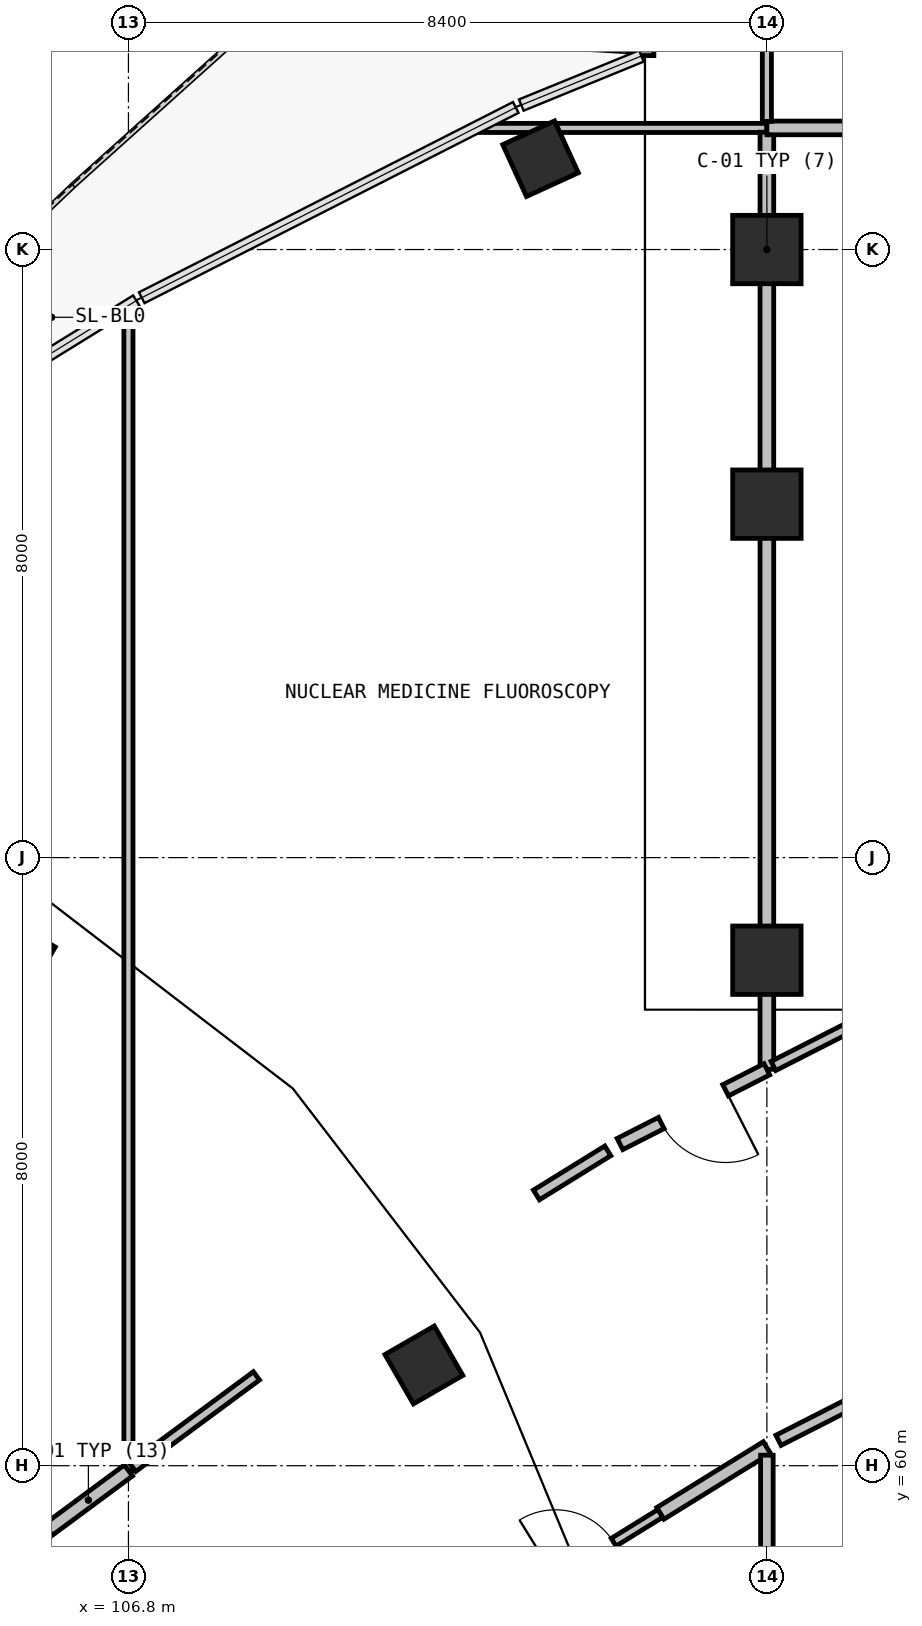
"""IFC4 building model, lengths in metres.
Left out: names, types, materials, properties, quantities, classifications, styles, units other than length and angle.
Written with IfcOpenShell. Run it as: python <this file> out.ifc"""

import sys

from ifc_helpers import new_model, si_unit, direction, frame, frame_2d, origin, origin_2d, place, context, subcontext, project, spatial, rectangle, circle, extrude, element, fill, save


model = new_model("IFC4")
c1 = context("Model", 3, precision=1e-05, world=origin(), true_north=direction((0.0, 1.0)))
c2 = subcontext(c1, "Body", "Model", "MODEL_VIEW")
j1 = project(units=[si_unit("LENGTHUNIT", "METRE"), si_unit("PLANEANGLEUNIT", "RADIAN")], contexts=[c1])
p1 = place(None, origin())
s1 = spatial("IfcSite", under=j1, at=p1, CompositionType="ELEMENT")
p2 = place(p1, origin())
s2 = spatial("IfcBuilding", under=s1, at=p2, CompositionType="ELEMENT")
p3 = place(p2, origin())
s3 = spatial("IfcBuildingStorey", under=s2, at=p3, CompositionType="ELEMENT", Elevation=0.0)
p4 = place(p3, frame((110.687, 61.325, 0.0), z_axis=(0.0, 0.0, 1.0), x_axis=(0.866025403784, 0.5, 0.0)))
e1 = element("IfcColumn", 1, at=p4, inside=s3, PredefinedType="COLUMN", context=c2, shape_type="SweptSolid", body=[
    extrude(circle(Radius=0.375, at=origin_2d()), origin(), (0.0, 0.0, 1.0), 5.4),
])
for number, where, z_axis, x_axis in (
    (2, (115.2, 66.65, 0.0), (0.0, 0.0, 1.0), (1.0, 0.0, 0.0)),
    (3, (115.2, 72.65, 0.0), (0.0, 0.0, 1.0), (1.0, 0.0, 0.0)),
    (4, (115.2, 76.0, 0.0), (0.0, 0.0, 1.0), (1.0, 0.0, 0.0)),
):
    element("IfcColumn", number, at=place(p3, frame(where, z_axis=z_axis, x_axis=x_axis)), inside=s3, PredefinedType="COLUMN", context=c2, shape_type="SweptSolid", body=[
        extrude(rectangle(XDim=0.9, YDim=0.9, at=origin_2d()), origin(), (0.0, 0.0, 1.0), 5.4),
    ])
p5 = place(p3, frame((112.222, 77.195, 0.0), z_axis=(0.0, 0.0, 1.0), x_axis=(-0.416201444857, 0.909272432937, 0.0)))
e5 = element("IfcColumn", 5, at=p5, inside=s3, PredefinedType="COLUMN", context=c2, shape_type="SweptSolid", body=[
    extrude(rectangle(XDim=0.75, YDim=0.75, at=origin_2d()), origin(), (0.0, 0.0, 1.0), 5.4),
])
p6 = place(p3, frame((113.563, 78.552, 0.0), z_axis=(0.0, 0.0, 1.0), x_axis=(0.006887325881, 0.99997628209, 0.0)))
e6 = element("IfcWall", 6, at=p6, inside=s3, PredefinedType="SOLIDWALL", context=c2, shape_type="SweptSolid", body=[
    extrude(rectangle(XDim=5.388, YDim=0.3, at=frame_2d((2.694, 0.0))), origin(), (0.0, 0.0, 1.0), 5.08),
])
p7 = place(p6, frame((1.344, 0.0, 0.96)))
e7 = element("IfcOpeningElement", 7, at=p7, cuts=e6, PredefinedType="OPENING", context=c2, shape_type="SweptSolid", body=[
    extrude(rectangle(XDim=2.7, YDim=1.5, at=frame_2d((1.35, 0.75))), frame((0.0, 0.16, 0.0), z_axis=(0.0, -1.0, 0.0), x_axis=(1.0, 0.0, 0.0)), (0.0, 0.0, 1.0), 0.32),
])
p8 = place(p3, frame((106.8, 75.251, 0.0), z_axis=(0.0, 0.0, 1.0), x_axis=(0.0, -1.0, 0.0)))
e8 = element("IfcWall", 8, at=p8, inside=s3, PredefinedType="PARTITIONING", context=c2, shape_type="SweptSolid", body=[
    extrude(rectangle(XDim=15.314, YDim=0.12, at=frame_2d((7.657, 0.0))), origin(), (0.0, 0.0, 1.0), 5.08),
])
p9 = place(p3, frame((106.8, 59.937, 0.0), z_axis=(0.0, 0.0, 1.0), x_axis=(-0.803804504583, -0.594893535359, 0.0)))
e9 = element("IfcWall", 9, at=p9, inside=s3, PredefinedType="PARTITIONING", context=c2, shape_type="SweptSolid", body=[
    extrude(rectangle(XDim=1.311, YDim=0.18, at=frame_2d((0.656, 0.0))), origin(), (0.0, 0.0, 1.0), 5.08),
])
p10 = place(p3, frame((111.803, 58.14, 0.0), z_axis=(0.0, 0.0, 1.0), x_axis=(0.850745998742, 0.525577059644, 0.0)))
e10 = element("IfcWall", 10, at=p10, inside=s3, PredefinedType="PARTITIONING", context=c2, shape_type="SweptSolid", body=[
    extrude(rectangle(XDim=2.346, YDim=0.12, at=frame_2d((1.173, 0.0))), origin(), (0.0, 0.0, 1.0), 5.08),
])
p11 = place(p10, frame((0.723, 0.0, 0.0)))
e11 = element("IfcOpeningElement", 11, at=p11, cuts=e10, PredefinedType="OPENING", context=c2, shape_type="SweptSolid", body=[
    extrude(rectangle(XDim=0.9, YDim=2.1, at=frame_2d((0.45, 1.05))), frame((0.0, 0.07, 0.0), z_axis=(0.0, -1.0, 0.0), x_axis=(1.0, 0.0, 0.0)), (0.0, 0.0, 1.0), 0.14),
])
p12 = place(p3, frame((113.799, 59.373, 0.0), z_axis=(0.0, 0.0, 1.0), x_axis=(0.850603007896, 0.525808447021, 0.0)))
e12 = element("IfcWall", 12, at=p12, inside=s3, PredefinedType="PARTITIONING", context=c2, shape_type="SweptSolid", body=[
    extrude(rectangle(XDim=1.647, YDim=0.18, at=frame_2d((0.823, 0.0))), origin(), (0.0, 0.0, 1.0), 5.08),
])
p13 = place(p3, frame((115.2, 60.138, 0.0), z_axis=(0.0, 0.0, 1.0), x_axis=(0.0, -1.0, 0.0)))
e13 = element("IfcWall", 13, at=p13, inside=s3, PredefinedType="PARTITIONING", context=c2, shape_type="SweptSolid", body=[
    extrude(rectangle(XDim=15.538, YDim=0.165, at=frame_2d((7.769, 0.0))), origin(), (0.0, 0.0, 1.0), 5.08),
])
p14 = place(p3, frame((113.107, 64.142, 0.0), z_axis=(0.0, 0.0, 1.0), x_axis=(-0.850745635825, -0.525577647093, 0.0)))
e14 = element("IfcWall", 14, at=p14, inside=s3, PredefinedType="PARTITIONING", context=c2, shape_type="SweptSolid", body=[
    extrude(rectangle(XDim=1.104, YDim=0.15, at=frame_2d((0.552, 0.0))), origin(), (0.0, 0.0, 1.0), 5.08),
])
p15 = place(p3, frame((108.484, 61.182, 0.0), z_axis=(0.0, 0.0, 1.0), x_axis=(-0.804033278553, -0.594584297622, 0.0)))
e15 = element("IfcWall", 15, at=p15, inside=s3, PredefinedType="PARTITIONING", context=c2, shape_type="SweptSolid", body=[
    extrude(rectangle(XDim=2.025, YDim=0.135, at=frame_2d((1.012, 0.0))), origin(), (0.0, 0.0, 1.0), 5.08),
])
p16 = place(p3, frame((111.391, 77.6, 0.0), z_axis=(0.0, 0.0, 1.0), x_axis=(1.0, 0.0, 0.0)))
e16 = element("IfcWall", 16, at=p16, inside=s3, PredefinedType="PARTITIONING", context=c2, shape_type="SweptSolid", body=[
    extrude(rectangle(XDim=3.809, YDim=0.12, at=frame_2d((1.904, 0.0))), origin(), (0.0, 0.0, 1.0), 5.08),
])
p17 = place(p3, frame((115.2, 77.544, 0.0), z_axis=(0.0, 0.0, 1.0), x_axis=(0.0, -1.0, 0.0)))
e17 = element("IfcWall", 17, at=p17, inside=s3, PredefinedType="PARTITIONING", context=c2, shape_type="SweptSolid", body=[
    extrude(rectangle(XDim=12.329, YDim=0.18, at=frame_2d((6.165, 0.0))), origin(), (0.0, 0.0, 1.0), 4.33),
])
p18 = place(p3, frame((115.2, 65.215, 0.0), z_axis=(0.0, 0.0, 1.0), x_axis=(-0.891321133159, -0.45337251525, 0.0)))
e18 = element("IfcWall", 18, at=p18, inside=s3, PredefinedType="PARTITIONING", context=c2, shape_type="SweptSolid", body=[
    extrude(rectangle(XDim=2.168, YDim=0.165, at=frame_2d((1.084, 0.0))), origin(), (0.0, 0.0, 1.0), 5.08),
])
p19 = place(p18, frame((0.609, 0.0, 0.0)))
e19 = element("IfcOpeningElement", 19, at=p19, cuts=e18, PredefinedType="OPENING", context=c2, shape_type="SweptSolid", body=[
    extrude(rectangle(XDim=0.95, YDim=2.1, at=frame_2d((0.475, 1.05))), frame((0.0, 0.093, 0.0), z_axis=(0.0, -1.0, 0.0), x_axis=(1.0, 0.0, 0.0)), (0.0, 0.0, 1.0), 0.185),
])
p20 = place(p3, frame((115.353, 60.334, 0.0), z_axis=(0.0, 0.0, 1.0), x_axis=(0.891251574009, 0.45350924117, 0.0)))
e20 = element("IfcWall", 20, at=p20, inside=s3, PredefinedType="PARTITIONING", context=c2, shape_type="SweptSolid", body=[
    extrude(rectangle(XDim=2.029, YDim=0.15, at=frame_2d((1.014, 0.0))), origin(), (0.0, 0.0, 1.0), 5.08),
])
p21 = place(p3, frame((117.151, 66.208, 0.0), z_axis=(0.0, 0.0, 1.0), x_axis=(-0.891254866421, -0.453502770753, 0.0)))
e21 = element("IfcWall", 21, at=p21, inside=s3, PredefinedType="PARTITIONING", context=c2, shape_type="SweptSolid", body=[
    extrude(rectangle(XDim=2.093, YDim=0.135, at=frame_2d((1.046, 0.0))), origin(), (0.0, 0.0, 1.0), 5.08),
])
p22 = place(p3, frame((115.2, 77.6, 0.0), z_axis=(0.0, 0.0, 1.0), x_axis=(1.0, 0.0, 0.0)))
e22 = element("IfcWall", 22, at=p22, inside=s3, PredefinedType="PARTITIONING", context=c2, shape_type="SweptSolid", body=[
    extrude(rectangle(XDim=8.4, YDim=0.18, at=frame_2d((4.2, 0.0))), origin(), (0.0, 0.0, 1.0), 5.08),
])
p23 = place(p3, frame((115.2, 104.69, 0.0), z_axis=(0.0, 0.0, 1.0), x_axis=(0.0, -1.0, 0.0)))
e23 = element("IfcWall", 23, at=p23, inside=s3, PredefinedType="PARTITIONING", context=c2, shape_type="SweptSolid", body=[
    extrude(rectangle(XDim=27.004, YDim=0.12, at=frame_2d((13.502, 0.0))), origin(), (0.0, 0.0, 1.0), 4.33),
])
p24 = place(p11, origin())
e24 = element("IfcDoor", 24, at=p24, inside=s3, OperationType="SINGLE_SWING_RIGHT", PredefinedType="DOOR", context=c2, shape_type="SweptSolid", body=[
    extrude(rectangle(XDim=0.9, YDim=2.1, at=frame_2d((0.45, 1.05))), frame((0.0, 0.025, 0.0), z_axis=(0.0, -1.0, 0.0), x_axis=(1.0, 0.0, 0.0)), (0.0, 0.0, 1.0), 0.05),
])
fill(e11, e24)
p25 = place(p19, origin())
e25 = element("IfcDoor", 25, at=p25, inside=s3, OperationType="SINGLE_SWING_LEFT", PredefinedType="DOOR", context=c2, shape_type="SweptSolid", body=[
    extrude(rectangle(XDim=0.95, YDim=2.1, at=frame_2d((0.475, 1.05))), frame((0.0, 0.025, 0.0), z_axis=(0.0, -1.0, 0.0), x_axis=(1.0, 0.0, 0.0)), (0.0, 0.0, 1.0), 0.05),
])
fill(e19, e25)
save(model, sys.argv[1])
